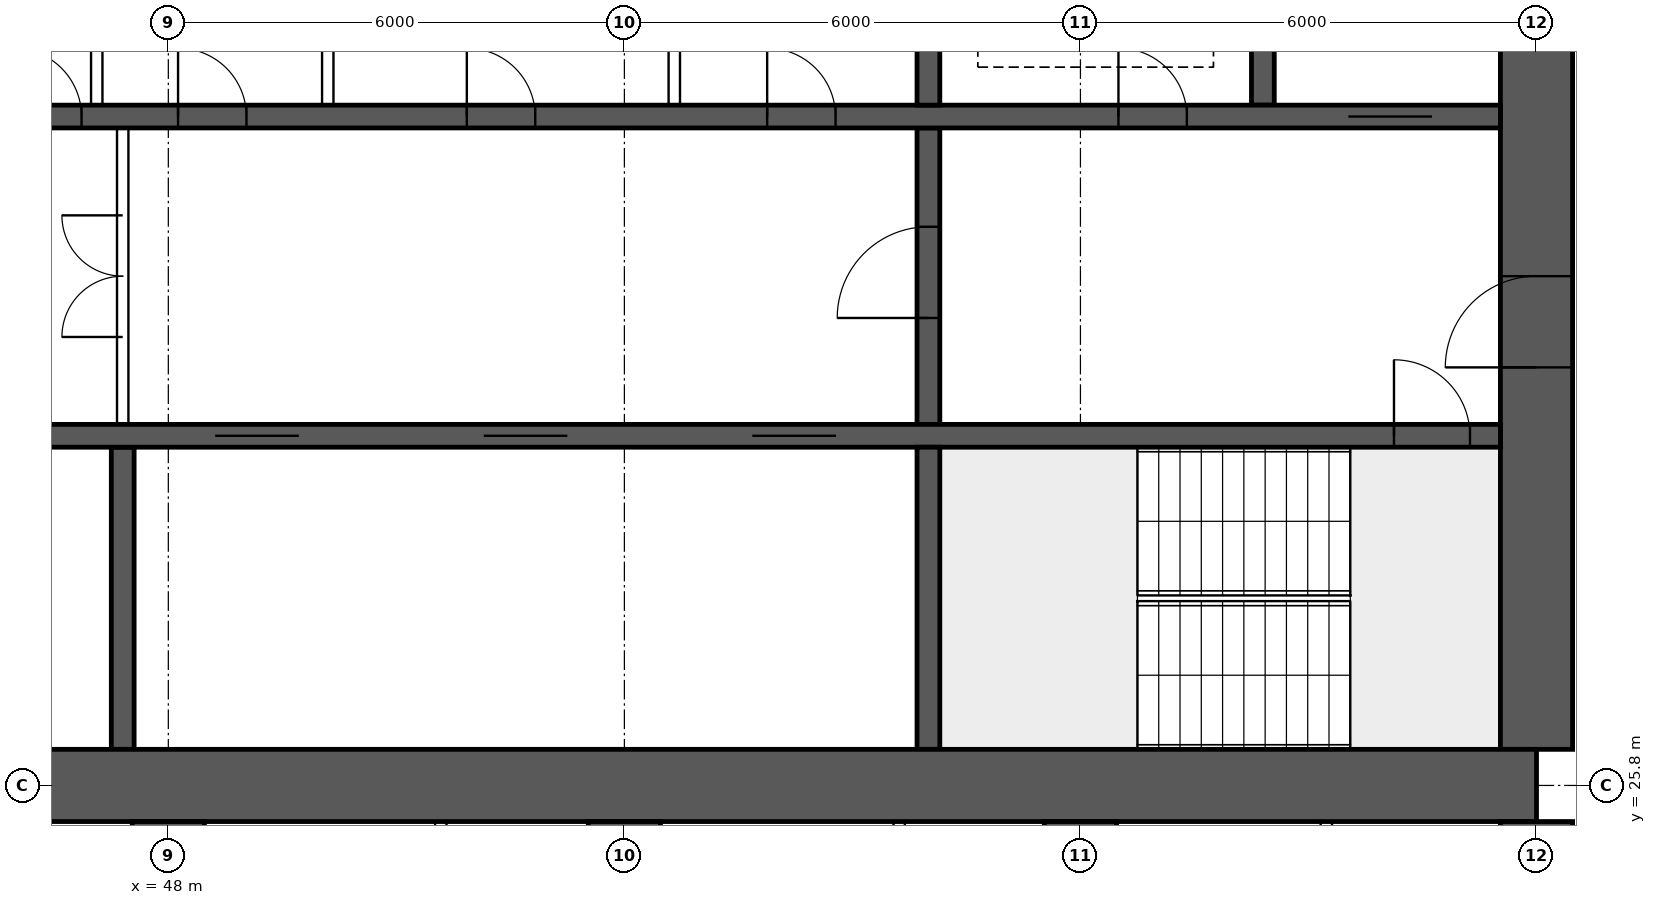
"""IFC4 building model, lengths in metres.
Left out: names, types, materials, properties, quantities, classifications, styles, units other than length and angle.
Written with IfcOpenShell. Run it as: python <this file> out.ifc"""

import sys

from ifc_helpers import new_model, si_unit, direction, frame, frame_2d, origin, place, context, subcontext, project, spatial, rectangle, extrude, element, fill, save


model = new_model("IFC4")
c1 = context("Model", 3, precision=1e-05, world=origin(), true_north=direction((0.0, 1.0)))
c2 = subcontext(c1, "Body", "Model", "MODEL_VIEW")
j1 = project(units=[si_unit("LENGTHUNIT", "METRE"), si_unit("PLANEANGLEUNIT", "RADIAN")], contexts=[c1])
p1 = place(None, origin())
s1 = spatial("IfcSite", under=j1, at=p1, CompositionType="ELEMENT")
p2 = place(p1, origin())
s2 = spatial("IfcBuilding", under=s1, at=p2, CompositionType="ELEMENT")
p3 = place(p2, frame((0.0, 0.0, 99.4)))
s3 = spatial("IfcBuildingStorey", under=s2, at=p3, CompositionType="ELEMENT", Elevation=99.4)
p4 = place(p3, frame((18.0, 25.8, 0.0), z_axis=(0.0, 0.0, 1.0), x_axis=(1.0, 0.0, 0.0)))
e1 = element("IfcWall", 1, at=p4, inside=s3, PredefinedType="SHEAR", context=c2, shape_type="SweptSolid", body=[
    extrude(rectangle(XDim=48.0, YDim=0.95, at=frame_2d((24.0, 0.0))), origin(), (0.0, 0.0, 1.0), 3.75),
])
p5 = place(p3, frame((66.0, 26.275, 0.0), z_axis=(0.0, 0.0, 1.0), x_axis=(0.0, 1.0, 0.0)))
e2 = element("IfcWall", 2, at=p5, inside=s3, PredefinedType="SHEAR", context=c2, shape_type="SweptSolid", body=[
    extrude(rectangle(XDim=11.45, YDim=0.95, at=frame_2d((5.725, 0.0))), origin(), (0.0, 0.0, 1.0), 3.75),
])
p6 = place(p5, frame((5.025, 0.0, 0.0)))
e3 = element("IfcOpeningElement", 3, at=p6, cuts=e2, PredefinedType="OPENING", context=c2, shape_type="SweptSolid", body=[
    extrude(rectangle(XDim=1.2, YDim=2.1, at=frame_2d((0.6, 1.05))), frame((0.0, 0.485, 0.0), z_axis=(0.0, -1.0, 0.0), x_axis=(1.0, 0.0, 0.0)), (0.0, 0.0, 1.0), 0.97),
])
p7 = place(p3, frame((18.475, 30.4, 0.0), z_axis=(0.0, 0.0, 1.0), x_axis=(1.0, 0.0, 0.0)))
e4 = element("IfcWall", 4, at=p7, inside=s3, PredefinedType="SHEAR", context=c2, shape_type="SweptSolid", body=[
    extrude(rectangle(XDim=47.05, YDim=0.3, at=frame_2d((23.525, 0.0))), origin(), (0.0, 0.0, 1.0), 3.75),
])
p8 = place(p7, frame((0.4, 0.0, 0.0)))
e5 = element("IfcOpeningElement", 5, at=p8, cuts=e4, PredefinedType="OPENING", context=c2, shape_type="SweptSolid", body=[
    extrude(rectangle(XDim=1.0, YDim=2.1, at=frame_2d((0.5, 1.05))), frame((0.0, 0.16, 0.0), z_axis=(0.0, -1.0, 0.0), x_axis=(1.0, 0.0, 0.0)), (0.0, 0.0, 1.0), 0.32),
])
p9 = place(p7, frame((45.65, 0.0, 0.0)))
e6 = element("IfcOpeningElement", 6, at=p9, cuts=e4, PredefinedType="OPENING", context=c2, shape_type="SweptSolid", body=[
    extrude(rectangle(XDim=1.0, YDim=2.1, at=frame_2d((0.5, 1.05))), frame((0.0, 0.16, 0.0), z_axis=(0.0, -1.0, 0.0), x_axis=(1.0, 0.0, 0.0)), (0.0, 0.0, 1.0), 0.32),
])
p10 = place(p7, frame((8.275, 0.0, 0.0)))
e7 = element("IfcOpeningElement", 7, at=p10, cuts=e4, PredefinedType="OPENING", context=c2, shape_type="SweptSolid", body=[
    extrude(rectangle(XDim=1.1, YDim=2.1, at=frame_2d((0.55, 1.05))), frame((0.0, 0.16, 0.0), z_axis=(0.0, -1.0, 0.0), x_axis=(1.0, 0.0, 0.0)), (0.0, 0.0, 1.0), 0.32),
])
p11 = place(p7, frame((10.875, 0.0, 0.0)))
e8 = element("IfcOpeningElement", 8, at=p11, cuts=e4, PredefinedType="OPENING", context=c2, shape_type="SweptSolid", body=[
    extrude(rectangle(XDim=1.1, YDim=2.1, at=frame_2d((0.55, 1.05))), frame((0.0, 0.16, 0.0), z_axis=(0.0, -1.0, 0.0), x_axis=(1.0, 0.0, 0.0)), (0.0, 0.0, 1.0), 0.32),
])
p12 = place(p7, frame((13.475, 0.0, 0.0)))
e9 = element("IfcOpeningElement", 9, at=p12, cuts=e4, PredefinedType="OPENING", context=c2, shape_type="SweptSolid", body=[
    extrude(rectangle(XDim=1.1, YDim=2.1, at=frame_2d((0.55, 1.05))), frame((0.0, 0.16, 0.0), z_axis=(0.0, -1.0, 0.0), x_axis=(1.0, 0.0, 0.0)), (0.0, 0.0, 1.0), 0.32),
])
p13 = place(p7, frame((16.075, 0.0, 0.0)))
e10 = element("IfcOpeningElement", 10, at=p13, cuts=e4, PredefinedType="OPENING", context=c2, shape_type="SweptSolid", body=[
    extrude(rectangle(XDim=1.1, YDim=2.1, at=frame_2d((0.55, 1.05))), frame((0.0, 0.16, 0.0), z_axis=(0.0, -1.0, 0.0), x_axis=(1.0, 0.0, 0.0)), (0.0, 0.0, 1.0), 0.32),
])
p14 = place(p7, frame((18.85, 0.0, 0.0)))
e11 = element("IfcOpeningElement", 11, at=p14, cuts=e4, PredefinedType="OPENING", context=c2, shape_type="SweptSolid", body=[
    extrude(rectangle(XDim=0.9, YDim=2.1, at=frame_2d((0.45, 1.05))), frame((0.0, 0.16, 0.0), z_axis=(0.0, -1.0, 0.0), x_axis=(1.0, 0.0, 0.0)), (0.0, 0.0, 1.0), 0.32),
])
p15 = place(p7, frame((30.142, 0.0, 0.0)))
e12 = element("IfcOpeningElement", 12, at=p15, cuts=e4, PredefinedType="OPENING", context=c2, shape_type="SweptSolid", body=[
    extrude(rectangle(XDim=1.1, YDim=2.1, at=frame_2d((0.55, 1.05))), frame((0.0, 0.16, 0.0), z_axis=(0.0, -1.0, 0.0), x_axis=(1.0, 0.0, 0.0)), (0.0, 0.0, 1.0), 0.32),
])
p16 = place(p7, frame((33.675, 0.0, 0.0)))
e13 = element("IfcOpeningElement", 13, at=p16, cuts=e4, PredefinedType="OPENING", context=c2, shape_type="SweptSolid", body=[
    extrude(rectangle(XDim=1.1, YDim=2.1, at=frame_2d((0.55, 1.05))), frame((0.0, 0.16, 0.0), z_axis=(0.0, -1.0, 0.0), x_axis=(1.0, 0.0, 0.0)), (0.0, 0.0, 1.0), 0.32),
])
p17 = place(p7, frame((37.208, 0.0, 0.0)))
e14 = element("IfcOpeningElement", 14, at=p17, cuts=e4, PredefinedType="OPENING", context=c2, shape_type="SweptSolid", body=[
    extrude(rectangle(XDim=1.1, YDim=2.1, at=frame_2d((0.55, 1.05))), frame((0.0, 0.16, 0.0), z_axis=(0.0, -1.0, 0.0), x_axis=(1.0, 0.0, 0.0)), (0.0, 0.0, 1.0), 0.32),
])
p18 = place(p3, frame((18.475, 34.6, 0.0), z_axis=(0.0, 0.0, 1.0), x_axis=(1.0, 0.0, 0.0)))
e15 = element("IfcWall", 15, at=p18, inside=s3, PredefinedType="SHEAR", context=c2, shape_type="SweptSolid", body=[
    extrude(rectangle(XDim=47.05, YDim=0.3, at=frame_2d((23.525, 0.0))), origin(), (0.0, 0.0, 1.0), 3.75),
])
p19 = place(p18, frame((0.9, 0.0, 0.0)))
e16 = element("IfcOpeningElement", 16, at=p19, cuts=e15, PredefinedType="OPENING", context=c2, shape_type="SweptSolid", body=[
    extrude(rectangle(XDim=1.1, YDim=2.1, at=frame_2d((0.55, 1.05))), frame((0.0, 0.16, 0.0), z_axis=(0.0, -1.0, 0.0), x_axis=(1.0, 0.0, 0.0)), (0.0, 0.0, 1.0), 0.32),
])
p20 = place(p18, frame((45.05, 0.0, 0.0)))
e17 = element("IfcOpeningElement", 17, at=p20, cuts=e15, PredefinedType="OPENING", context=c2, shape_type="SweptSolid", body=[
    extrude(rectangle(XDim=1.1, YDim=2.1, at=frame_2d((0.55, 1.05))), frame((0.0, 0.16, 0.0), z_axis=(0.0, -1.0, 0.0), x_axis=(1.0, 0.0, 0.0)), (0.0, 0.0, 1.0), 0.32),
])
p21 = place(p18, frame((4.125, 0.0, 0.0)))
e18 = element("IfcOpeningElement", 18, at=p21, cuts=e15, PredefinedType="OPENING", context=c2, shape_type="SweptSolid", body=[
    extrude(rectangle(XDim=0.9, YDim=2.1, at=frame_2d((0.45, 1.05))), frame((0.0, 0.16, 0.0), z_axis=(0.0, -1.0, 0.0), x_axis=(1.0, 0.0, 0.0)), (0.0, 0.0, 1.0), 0.32),
])
p22 = place(p18, frame((42.025, 0.0, 0.0)))
e19 = element("IfcOpeningElement", 19, at=p22, cuts=e15, PredefinedType="OPENING", context=c2, shape_type="SweptSolid", body=[
    extrude(rectangle(XDim=0.9, YDim=2.1, at=frame_2d((0.45, 1.05))), frame((0.0, 0.16, 0.0), z_axis=(0.0, -1.0, 0.0), x_axis=(1.0, 0.0, 0.0)), (0.0, 0.0, 1.0), 0.32),
])
p23 = place(p18, frame((8.9, 0.0, 0.0)))
e20 = element("IfcOpeningElement", 20, at=p23, cuts=e15, PredefinedType="OPENING", context=c2, shape_type="SweptSolid", body=[
    extrude(rectangle(XDim=0.9, YDim=2.1, at=frame_2d((0.45, 1.05))), frame((0.0, 0.16, 0.0), z_axis=(0.0, -1.0, 0.0), x_axis=(1.0, 0.0, 0.0)), (0.0, 0.0, 1.0), 0.32),
])
p24 = place(p18, frame((12.874, 0.0, 0.0)))
e21 = element("IfcOpeningElement", 21, at=p24, cuts=e15, PredefinedType="OPENING", context=c2, shape_type="SweptSolid", body=[
    extrude(rectangle(XDim=0.9, YDim=2.1, at=frame_2d((0.45, 1.05))), frame((0.0, 0.16, 0.0), z_axis=(0.0, -1.0, 0.0), x_axis=(1.0, 0.0, 0.0)), (0.0, 0.0, 1.0), 0.32),
])
p25 = place(p18, frame((16.521, 0.0, 0.0)))
e22 = element("IfcOpeningElement", 22, at=p25, cuts=e15, PredefinedType="OPENING", context=c2, shape_type="SweptSolid", body=[
    extrude(rectangle(XDim=0.9, YDim=2.1, at=frame_2d((0.45, 1.05))), frame((0.0, 0.16, 0.0), z_axis=(0.0, -1.0, 0.0), x_axis=(1.0, 0.0, 0.0)), (0.0, 0.0, 1.0), 0.32),
])
p26 = place(p18, frame((20.28, 0.0, 0.0)))
e23 = element("IfcOpeningElement", 23, at=p26, cuts=e15, PredefinedType="OPENING", context=c2, shape_type="SweptSolid", body=[
    extrude(rectangle(XDim=0.9, YDim=2.1, at=frame_2d((0.45, 1.05))), frame((0.0, 0.16, 0.0), z_axis=(0.0, -1.0, 0.0), x_axis=(1.0, 0.0, 0.0)), (0.0, 0.0, 1.0), 0.32),
])
p27 = place(p18, frame((24.686, 0.0, 0.0)))
e24 = element("IfcOpeningElement", 24, at=p27, cuts=e15, PredefinedType="OPENING", context=c2, shape_type="SweptSolid", body=[
    extrude(rectangle(XDim=0.9, YDim=2.1, at=frame_2d((0.45, 1.05))), frame((0.0, 0.16, 0.0), z_axis=(0.0, -1.0, 0.0), x_axis=(1.0, 0.0, 0.0)), (0.0, 0.0, 1.0), 0.32),
])
p28 = place(p18, frame((27.483, 0.0, 0.0)))
e25 = element("IfcOpeningElement", 25, at=p28, cuts=e15, PredefinedType="OPENING", context=c2, shape_type="SweptSolid", body=[
    extrude(rectangle(XDim=0.9, YDim=2.1, at=frame_2d((0.45, 1.05))), frame((0.0, 0.16, 0.0), z_axis=(0.0, -1.0, 0.0), x_axis=(1.0, 0.0, 0.0)), (0.0, 0.0, 1.0), 0.32),
])
p29 = place(p18, frame((29.653, 0.0, 0.0)))
e26 = element("IfcOpeningElement", 26, at=p29, cuts=e15, PredefinedType="OPENING", context=c2, shape_type="SweptSolid", body=[
    extrude(rectangle(XDim=0.9, YDim=2.1, at=frame_2d((0.45, 1.05))), frame((0.0, 0.16, 0.0), z_axis=(0.0, -1.0, 0.0), x_axis=(1.0, 0.0, 0.0)), (0.0, 0.0, 1.0), 0.32),
])
p30 = place(p18, frame((33.452, 0.0, 0.0)))
e27 = element("IfcOpeningElement", 27, at=p30, cuts=e15, PredefinedType="OPENING", context=c2, shape_type="SweptSolid", body=[
    extrude(rectangle(XDim=0.9, YDim=2.1, at=frame_2d((0.45, 1.05))), frame((0.0, 0.16, 0.0), z_axis=(0.0, -1.0, 0.0), x_axis=(1.0, 0.0, 0.0)), (0.0, 0.0, 1.0), 0.32),
])
p31 = place(p18, frame((37.403, 0.0, 0.0)))
e28 = element("IfcOpeningElement", 28, at=p31, cuts=e15, PredefinedType="OPENING", context=c2, shape_type="SweptSolid", body=[
    extrude(rectangle(XDim=0.9, YDim=2.1, at=frame_2d((0.45, 1.05))), frame((0.0, 0.16, 0.0), z_axis=(0.0, -1.0, 0.0), x_axis=(1.0, 0.0, 0.0)), (0.0, 0.0, 1.0), 0.32),
])
p32 = place(p3, frame((58.0, 26.275, 0.0), z_axis=(0.0, 0.0, 1.0), x_axis=(0.0, 1.0, 0.0)))
e29 = element("IfcWall", 29, at=p32, inside=s3, PredefinedType="SHEAR", context=c2, shape_type="SweptSolid", body=[
    extrude(rectangle(XDim=3.975, YDim=0.3, at=frame_2d((1.988, 0.0))), origin(), (0.0, 0.0, 1.0), 3.75),
])
p33 = place(p3, frame((58.0, 30.55, 0.0), z_axis=(0.0, 0.0, 1.0), x_axis=(0.0, 1.0, 0.0)))
e30 = element("IfcWall", 30, at=p33, inside=s3, PredefinedType="SHEAR", context=c2, shape_type="SweptSolid", body=[
    extrude(rectangle(XDim=3.9, YDim=0.3, at=frame_2d((1.95, 0.0))), origin(), (0.0, 0.0, 1.0), 3.75),
])
p34 = place(p33, frame((1.4, 0.0, 0.0)))
e31 = element("IfcOpeningElement", 31, at=p34, cuts=e30, PredefinedType="OPENING", context=c2, shape_type="SweptSolid", body=[
    extrude(rectangle(XDim=1.2, YDim=2.1, at=frame_2d((0.6, 1.05))), frame((0.0, 0.16, 0.0), z_axis=(0.0, -1.0, 0.0), x_axis=(1.0, 0.0, 0.0)), (0.0, 0.0, 1.0), 0.32),
])
for number, where, z_axis, x_axis in (
    (32, (62.4, 34.75, 0.0), (0.0, 0.0, 1.0), (0.0, 1.0, 0.0)),
    (33, (58.0, 34.75, 0.0), (0.0, 0.0, 1.0), (0.0, 1.0, 0.0)),
):
    element("IfcWall", number, at=place(p3, frame(where, z_axis=z_axis, x_axis=x_axis)), inside=s3, PredefinedType="SHEAR", context=c2, shape_type="SweptSolid", body=[
        extrude(rectangle(XDim=2.975, YDim=0.3, at=frame_2d((1.488, 0.0))), origin(), (0.0, 0.0, 1.0), 3.75),
    ])
p35 = place(p3, frame((47.4, 26.275, 0.0), z_axis=(0.0, 0.0, 1.0), x_axis=(0.0, 1.0, 0.0)))
e34 = element("IfcWall", 34, at=p35, inside=s3, PredefinedType="SHEAR", context=c2, shape_type="SweptSolid", body=[
    extrude(rectangle(XDim=3.975, YDim=0.3, at=frame_2d((1.988, 0.0))), origin(), (0.0, 0.0, 1.0), 3.75),
])
for number, where, z_axis, x_axis in (
    (35, (48.0, 16.0, 0.0), (0.0, 0.0, 1.0), (0.0, 1.0, 0.0)),
    (36, (54.0, 16.0, 0.0), (0.0, 0.0, 1.0), (0.0, 1.0, 0.0)),
    (37, (60.0, 16.0, 0.0), (0.0, 0.0, 1.0), (0.0, 1.0, 0.0)),
    (38, (66.0, 16.0, 0.0), (0.0, 0.0, 1.0), (0.0, 1.0, 0.0)),
):
    element("IfcWall", number, at=place(p3, frame(where, z_axis=z_axis, x_axis=x_axis)), inside=s3, PredefinedType="SHEAR", context=c2, shape_type="SweptSolid", body=[
        extrude(rectangle(XDim=9.325, YDim=0.95, at=frame_2d((4.663, 0.0))), origin(), (0.0, 0.0, 1.0), 3.75),
    ])
p36 = place(p3, frame((47.4, 30.55, 0.0), z_axis=(0.0, 0.0, 1.0), x_axis=(0.0, 1.0, 0.0)))
e39 = element("IfcWall", 39, at=p36, inside=s3, PredefinedType="SOLIDWALL", context=c2, shape_type="SweptSolid", body=[
    extrude(rectangle(XDim=3.9, YDim=0.15, at=frame_2d((1.95, 0.0))), origin(), (0.0, 0.0, 1.0), 3.5),
])
p37 = place(p36, frame((1.15, 0.0, 0.0)))
e40 = element("IfcOpeningElement", 40, at=p37, cuts=e39, PredefinedType="OPENING", context=c2, shape_type="SweptSolid", body=[
    extrude(rectangle(XDim=1.6, YDim=2.1, at=frame_2d((0.8, 1.05))), frame((0.0, 0.085, 0.0), z_axis=(0.0, -1.0, 0.0), x_axis=(1.0, 0.0, 0.0)), (0.0, 0.0, 1.0), 0.17),
])
for number, where, z_axis, x_axis in (
    (41, (47.058, 34.75, 0.0), (0.0, 0.0, 1.0), (0.0, 1.0, 0.0)),
    (42, (50.098, 34.75, 0.0), (0.0, 0.0, 1.0), (0.0, 1.0, 0.0)),
    (43, (54.657, 34.75, 0.0), (0.0, 0.0, 1.0), (0.0, 1.0, 0.0)),
):
    element("IfcWall", number, at=place(p3, frame(where, z_axis=z_axis, x_axis=x_axis)), inside=s3, PredefinedType="SOLIDWALL", context=c2, shape_type="SweptSolid", body=[
        extrude(rectangle(XDim=2.975, YDim=0.15, at=frame_2d((1.488, 0.0))), origin(), (0.0, 0.0, 1.0), 3.5),
    ])
for number, where, z_axis, x_axis in (
    (44, (51.585, 16.1, 0.0), (0.0, 0.0, 1.0), (0.0, 1.0, 0.0)),
    (45, (57.615, 16.1, 0.0), (0.0, 0.0, 1.0), (0.0, 1.0, 0.0)),
    (46, (63.235, 16.1, 0.0), (0.0, 0.0, 1.0), (0.0, 1.0, 0.0)),
):
    element("IfcWall", number, at=place(p3, frame(where, z_axis=z_axis, x_axis=x_axis)), inside=s3, PredefinedType="PARTITIONING", context=c2, shape_type="SweptSolid", body=[
        extrude(rectangle(XDim=9.225, YDim=0.15, at=frame_2d((4.612, 0.0))), origin(), (0.0, 0.0, 1.0), 3.5),
    ])
p38 = place(p37, origin())
e47 = element("IfcDoor", 47, at=p38, inside=s3, OperationType="DOUBLE_DOOR_SINGLE_SWING", PredefinedType="DOOR", context=c2, shape_type="SweptSolid", body=[
    extrude(rectangle(XDim=1.6, YDim=2.1, at=frame_2d((0.8, 1.05))), frame((0.0, 0.025, 0.0), z_axis=(0.0, -1.0, 0.0), x_axis=(1.0, 0.0, 0.0)), (0.0, 0.0, 1.0), 0.05),
])
fill(e40, e47)
p39 = place(p6, origin())
e48 = element("IfcDoor", 48, at=p39, inside=s3, OperationType="SINGLE_SWING_LEFT", PredefinedType="DOOR", context=c2, shape_type="SweptSolid", body=[
    extrude(rectangle(XDim=1.2, YDim=2.1, at=frame_2d((0.6, 1.05))), frame((0.0, 0.025, 0.0), z_axis=(0.0, -1.0, 0.0), x_axis=(1.0, 0.0, 0.0)), (0.0, 0.0, 1.0), 0.05),
])
fill(e3, e48)
p40 = place(p9, origin())
e49 = element("IfcDoor", 49, at=p40, inside=s3, OperationType="SINGLE_SWING_LEFT", PredefinedType="DOOR", context=c2, shape_type="SweptSolid", body=[
    extrude(rectangle(XDim=1.0, YDim=2.1, at=frame_2d((0.5, 1.05))), frame((0.0, 0.025, 0.0), z_axis=(0.0, -1.0, 0.0), x_axis=(1.0, 0.0, 0.0)), (0.0, 0.0, 1.0), 0.05),
])
fill(e6, e49)
p41 = place(p20, origin())
e50 = element("IfcDoor", 50, at=p41, inside=s3, OperationType="DOUBLE_DOOR_SLIDING", PredefinedType="DOOR", context=c2, shape_type="SweptSolid", body=[
    extrude(rectangle(XDim=1.1, YDim=2.1, at=frame_2d((0.55, 1.05))), frame((0.0, 0.025, 0.0), z_axis=(0.0, -1.0, 0.0), x_axis=(1.0, 0.0, 0.0)), (0.0, 0.0, 1.0), 0.05),
])
fill(e17, e50)
p42 = place(p22, origin())
e51 = element("IfcDoor", 51, at=p42, inside=s3, OperationType="SINGLE_SWING_LEFT", PredefinedType="DOOR", context=c2, shape_type="SweptSolid", body=[
    extrude(rectangle(XDim=0.9, YDim=2.1, at=frame_2d((0.45, 1.05))), frame((0.0, 0.025, 0.0), z_axis=(0.0, -1.0, 0.0), x_axis=(1.0, 0.0, 0.0)), (0.0, 0.0, 1.0), 0.05),
])
fill(e19, e51)
p43 = place(p34, origin())
e52 = element("IfcDoor", 52, at=p43, inside=s3, OperationType="SINGLE_SWING_LEFT", PredefinedType="DOOR", context=c2, shape_type="SweptSolid", body=[
    extrude(rectangle(XDim=1.2, YDim=2.1, at=frame_2d((0.6, 1.05))), frame((0.0, 0.025, 0.0), z_axis=(0.0, -1.0, 0.0), x_axis=(1.0, 0.0, 0.0)), (0.0, 0.0, 1.0), 0.05),
])
fill(e31, e52)
p44 = place(p28, origin())
e53 = element("IfcDoor", 53, at=p44, inside=s3, OperationType="SINGLE_SWING_LEFT", PredefinedType="DOOR", context=c2, shape_type="SweptSolid", body=[
    extrude(rectangle(XDim=0.9, YDim=2.1, at=frame_2d((0.45, 1.05))), frame((0.0, 0.025, 0.0), z_axis=(0.0, -1.0, 0.0), x_axis=(1.0, 0.0, 0.0)), (0.0, 0.0, 1.0), 0.05),
])
fill(e25, e53)
p45 = place(p29, origin())
e54 = element("IfcDoor", 54, at=p45, inside=s3, OperationType="SINGLE_SWING_LEFT", PredefinedType="DOOR", context=c2, shape_type="SweptSolid", body=[
    extrude(rectangle(XDim=0.9, YDim=2.1, at=frame_2d((0.45, 1.05))), frame((0.0, 0.025, 0.0), z_axis=(0.0, -1.0, 0.0), x_axis=(1.0, 0.0, 0.0)), (0.0, 0.0, 1.0), 0.05),
])
fill(e26, e54)
p46 = place(p30, origin())
e55 = element("IfcDoor", 55, at=p46, inside=s3, OperationType="SINGLE_SWING_LEFT", PredefinedType="DOOR", context=c2, shape_type="SweptSolid", body=[
    extrude(rectangle(XDim=0.9, YDim=2.1, at=frame_2d((0.45, 1.05))), frame((0.0, 0.025, 0.0), z_axis=(0.0, -1.0, 0.0), x_axis=(1.0, 0.0, 0.0)), (0.0, 0.0, 1.0), 0.05),
])
fill(e27, e55)
p47 = place(p31, origin())
e56 = element("IfcDoor", 56, at=p47, inside=s3, OperationType="SINGLE_SWING_LEFT", PredefinedType="DOOR", context=c2, shape_type="SweptSolid", body=[
    extrude(rectangle(XDim=0.9, YDim=2.1, at=frame_2d((0.45, 1.05))), frame((0.0, 0.025, 0.0), z_axis=(0.0, -1.0, 0.0), x_axis=(1.0, 0.0, 0.0)), (0.0, 0.0, 1.0), 0.05),
])
fill(e28, e56)
p48 = place(p15, origin())
e57 = element("IfcDoor", 57, at=p48, inside=s3, OperationType="DOUBLE_DOOR_SLIDING", PredefinedType="DOOR", context=c2, shape_type="SweptSolid", body=[
    extrude(rectangle(XDim=1.1, YDim=2.1, at=frame_2d((0.55, 1.05))), frame((0.0, 0.025, 0.0), z_axis=(0.0, -1.0, 0.0), x_axis=(1.0, 0.0, 0.0)), (0.0, 0.0, 1.0), 0.05),
])
fill(e12, e57)
p49 = place(p16, origin())
e58 = element("IfcDoor", 58, at=p49, inside=s3, OperationType="DOUBLE_DOOR_SLIDING", PredefinedType="DOOR", context=c2, shape_type="SweptSolid", body=[
    extrude(rectangle(XDim=1.1, YDim=2.1, at=frame_2d((0.55, 1.05))), frame((0.0, 0.025, 0.0), z_axis=(0.0, -1.0, 0.0), x_axis=(1.0, 0.0, 0.0)), (0.0, 0.0, 1.0), 0.05),
])
fill(e13, e58)
p50 = place(p17, origin())
e59 = element("IfcDoor", 59, at=p50, inside=s3, OperationType="DOUBLE_DOOR_SLIDING", PredefinedType="DOOR", context=c2, shape_type="SweptSolid", body=[
    extrude(rectangle(XDim=1.1, YDim=2.1, at=frame_2d((0.55, 1.05))), frame((0.0, 0.025, 0.0), z_axis=(0.0, -1.0, 0.0), x_axis=(1.0, 0.0, 0.0)), (0.0, 0.0, 1.0), 0.05),
])
fill(e14, e59)
save(model, sys.argv[1])
